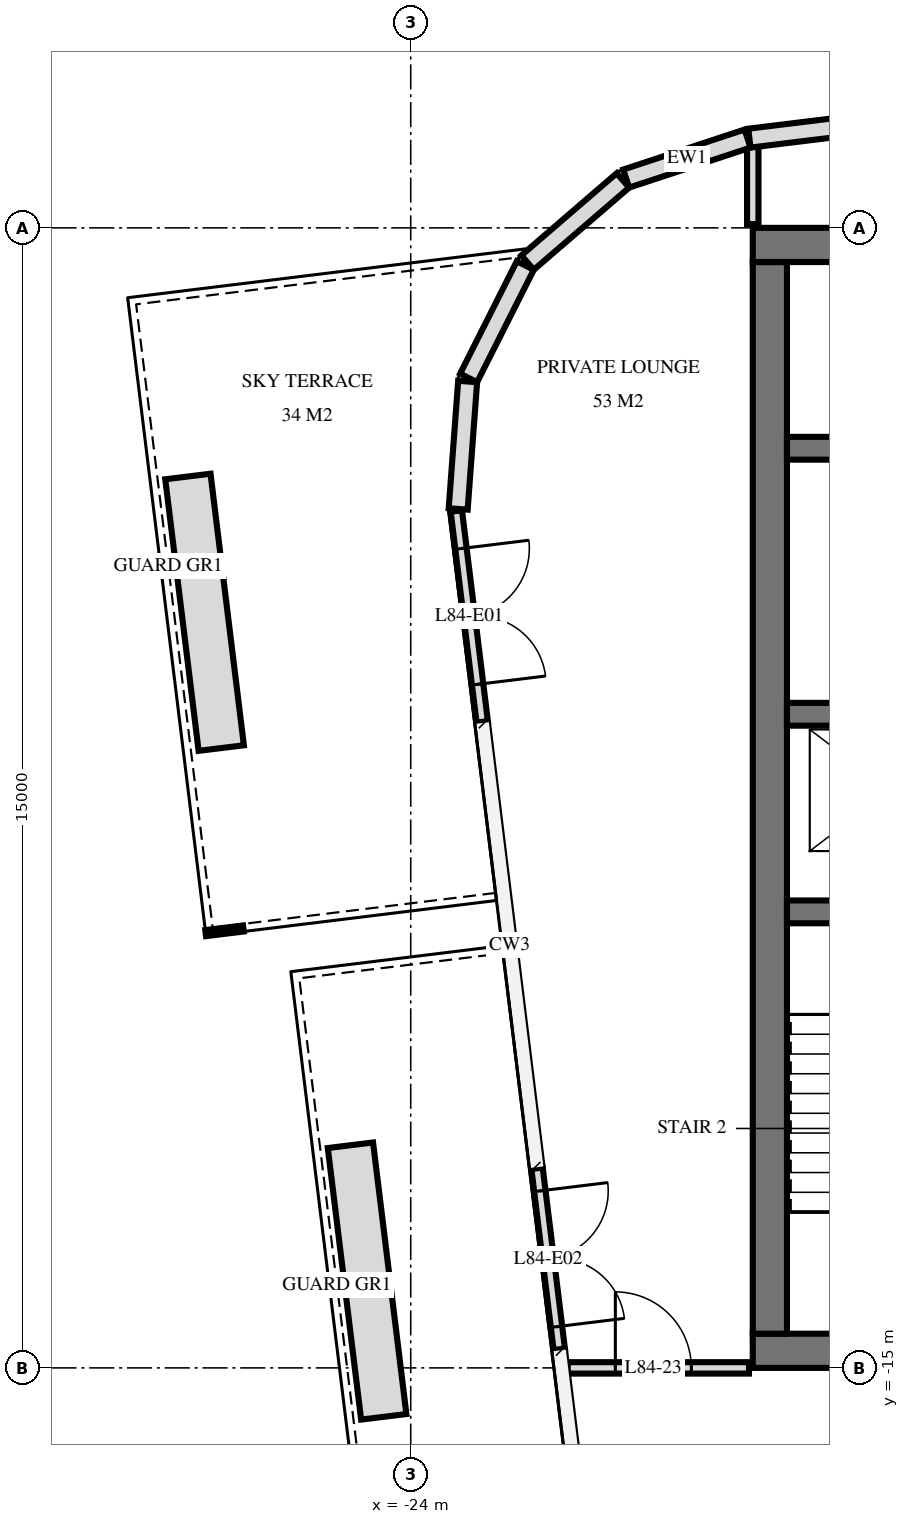
"""IFC4 building model, lengths in metres.
Left out: names, types, materials, properties, quantities, classifications, styles, units other than length and angle.
Written with IfcOpenShell. Run it as: python <this file> out.ifc"""

import sys

from ifc_helpers import new_model, si_unit, direction, frame, frame_2d, origin, place, context, subcontext, project, spatial, rectangle, extrude, element, fill, save


model = new_model("IFC4")
c1 = context("Model", 3, precision=1e-05, world=origin(), true_north=direction((0.0, 1.0)))
c2 = subcontext(c1, "Body", "Model", "MODEL_VIEW")
j1 = project(units=[si_unit("LENGTHUNIT", "METRE"), si_unit("PLANEANGLEUNIT", "RADIAN")], contexts=[c1])
p1 = place(None, origin())
s1 = spatial("IfcSite", under=j1, at=p1, CompositionType="ELEMENT")
p2 = place(p1, origin())
s2 = spatial("IfcBuilding", under=s1, at=p2, CompositionType="ELEMENT")
p3 = place(p2, frame((0.0, 0.0, 318.6)))
s3 = spatial("IfcBuildingStorey", under=s2, at=p3, CompositionType="ELEMENT", Elevation=318.6)
p4 = place(p3, frame((-19.5, -0.225, 0.0), z_axis=(0.0, 0.0, 1.0), x_axis=(1.0, 0.0, 0.0)))
e1 = element("IfcWall", 1, at=p4, inside=s3, PredefinedType="SHEAR", context=c2, shape_type="SweptSolid", body=[
    extrude(rectangle(XDim=9.5, YDim=0.45, at=frame_2d((4.75, 0.0))), origin(), (0.0, 0.0, 1.0), 4.0),
])
p5 = place(p3, frame((-19.5, -14.775, 0.0), z_axis=(0.0, 0.0, 1.0), x_axis=(1.0, 0.0, 0.0)))
e2 = element("IfcWall", 2, at=p5, inside=s3, PredefinedType="SHEAR", context=c2, shape_type="SweptSolid", body=[
    extrude(rectangle(XDim=9.5, YDim=0.45, at=frame_2d((4.75, 0.0))), origin(), (0.0, 0.0, 1.0), 4.0),
])
p6 = place(p5, frame((1.2, 0.0, 0.0)))
e3 = element("IfcOpeningElement", 3, at=p6, cuts=e2, PredefinedType="OPENING", context=c2, shape_type="SweptSolid", body=[
    extrude(rectangle(XDim=1.2, YDim=2.1, at=frame_2d((0.6, 1.05))), frame((0.0, 0.235, 0.0), z_axis=(0.0, -1.0, 0.0), x_axis=(1.0, 0.0, 0.0)), (0.0, 0.0, 1.0), 0.47),
])
p7 = place(p5, frame((4.25, 0.0, 0.0)))
e4 = element("IfcOpeningElement", 4, at=p7, cuts=e2, PredefinedType="OPENING", context=c2, shape_type="SweptSolid", body=[
    extrude(rectangle(XDim=1.1, YDim=2.1, at=frame_2d((0.55, 1.05))), frame((0.0, 0.235, 0.0), z_axis=(0.0, -1.0, 0.0), x_axis=(1.0, 0.0, 0.0)), (0.0, 0.0, 1.0), 0.47),
])
p8 = place(p3, frame((-19.275, -14.55, 0.0), z_axis=(0.0, 0.0, 1.0), x_axis=(0.0, 1.0, 0.0)))
e5 = element("IfcWall", 5, at=p8, inside=s3, PredefinedType="SHEAR", context=c2, shape_type="SweptSolid", body=[
    extrude(rectangle(XDim=14.1, YDim=0.45, at=frame_2d((7.05, 0.0))), origin(), (0.0, 0.0, 1.0), 4.0),
])
p9 = place(p3, frame((-19.05, -2.9, 0.0), z_axis=(0.0, 0.0, 1.0), x_axis=(1.0, 0.0, 0.0)))
e6 = element("IfcWall", 6, at=p9, inside=s3, PredefinedType="SHEAR", context=c2, shape_type="SweptSolid", body=[
    extrude(rectangle(XDim=8.7, YDim=0.3, at=frame_2d((4.35, 0.0))), origin(), (0.0, 0.0, 1.0), 4.0),
])
p10 = place(p9, frame((6.8, 0.0, 0.0)))
e7 = element("IfcOpeningElement", 7, at=p10, cuts=e6, PredefinedType="OPENING", context=c2, shape_type="SweptSolid", body=[
    extrude(rectangle(XDim=1.1, YDim=2.1, at=frame_2d((0.55, 1.05))), frame((0.0, 0.16, 0.0), z_axis=(0.0, -1.0, 0.0), x_axis=(1.0, 0.0, 0.0)), (0.0, 0.0, 1.0), 0.32),
])
p11 = place(p9, frame((3.8, 0.0, 0.0)))
e8 = element("IfcOpeningElement", 8, at=p11, cuts=e6, PredefinedType="OPENING", context=c2, shape_type="SweptSolid", body=[
    extrude(rectangle(XDim=1.1, YDim=2.1, at=frame_2d((0.55, 1.05))), frame((0.0, 0.16, 0.0), z_axis=(0.0, -1.0, 0.0), x_axis=(1.0, 0.0, 0.0)), (0.0, 0.0, 1.0), 0.32),
])
p12 = place(p9, frame((0.9, 0.0, 0.0)))
e9 = element("IfcOpeningElement", 9, at=p12, cuts=e6, PredefinedType="OPENING", context=c2, shape_type="SweptSolid", body=[
    extrude(rectangle(XDim=0.9, YDim=2.1, at=frame_2d((0.45, 1.05))), frame((0.0, 0.16, 0.0), z_axis=(0.0, -1.0, 0.0), x_axis=(1.0, 0.0, 0.0)), (0.0, 0.0, 1.0), 0.32),
])
p13 = place(p3, frame((-19.05, -6.4, 0.0), z_axis=(0.0, 0.0, 1.0), x_axis=(1.0, 0.0, 0.0)))
e10 = element("IfcWall", 10, at=p13, inside=s3, PredefinedType="SHEAR", context=c2, shape_type="SweptSolid", body=[
    extrude(rectangle(XDim=8.7, YDim=0.3, at=frame_2d((4.35, 0.0))), origin(), (0.0, 0.0, 1.0), 4.0),
])
p14 = place(p13, frame((0.8, 0.0, 0.0)))
e11 = element("IfcOpeningElement", 11, at=p14, cuts=e10, PredefinedType="OPENING", context=c2, shape_type="SweptSolid", body=[
    extrude(rectangle(XDim=1.1, YDim=2.1, at=frame_2d((0.55, 1.05))), frame((0.0, 0.16, 0.0), z_axis=(0.0, -1.0, 0.0), x_axis=(1.0, 0.0, 0.0)), (0.0, 0.0, 1.0), 0.32),
])
p15 = place(p3, frame((-19.05, -9.0, 0.0), z_axis=(0.0, 0.0, 1.0), x_axis=(1.0, 0.0, 0.0)))
e12 = element("IfcWall", 12, at=p15, inside=s3, PredefinedType="SHEAR", context=c2, shape_type="SweptSolid", body=[
    extrude(rectangle(XDim=8.7, YDim=0.3, at=frame_2d((4.35, 0.0))), origin(), (0.0, 0.0, 1.0), 4.0),
])
p16 = place(p15, frame((3.8, 0.0, 0.0)))
e13 = element("IfcOpeningElement", 13, at=p16, cuts=e12, PredefinedType="OPENING", context=c2, shape_type="SweptSolid", body=[
    extrude(rectangle(XDim=1.1, YDim=2.1, at=frame_2d((0.55, 1.05))), frame((0.0, 0.16, 0.0), z_axis=(0.0, -1.0, 0.0), x_axis=(1.0, 0.0, 0.0)), (0.0, 0.0, 1.0), 0.32),
])
p17 = place(p3, frame((16.138, 5.561, 0.0), z_axis=(0.0, 0.0, 1.0), x_axis=(-0.992546726876, -0.121864658405, 0.0)))
e14 = element("IfcWall", 14, at=p17, inside=s3, PredefinedType="SOLIDWALL", context=c2, shape_type="SweptSolid", body=[
    extrude(rectangle(XDim=35.951, YDim=0.25, at=frame_2d((17.975, 0.0))), origin(), (0.0, 0.0, 1.0), 3.72),
])
p18 = place(p3, frame((-19.568, 1.175, 0.0), z_axis=(0.0, 0.0, 1.0), x_axis=(-0.949694735798, -0.313177120489, 0.0)))
e15 = element("IfcWall", 15, at=p18, inside=s3, PredefinedType="SOLIDWALL", context=c2, shape_type="SweptSolid", body=[
    extrude(rectangle(XDim=1.681, YDim=0.25, at=frame_2d((0.841, 0.0))), origin(), (0.0, 0.0, 1.0), 3.72),
])
p19 = place(p3, frame((-21.208, 0.624, 0.0), z_axis=(0.0, 0.0, 1.0), x_axis=(-0.757568315466, -0.652755886531, 0.0)))
e16 = element("IfcWall", 16, at=p19, inside=s3, PredefinedType="SOLIDWALL", context=c2, shape_type="SweptSolid", body=[
    extrude(rectangle(XDim=1.656, YDim=0.25, at=frame_2d((0.828, 0.0))), origin(), (0.0, 0.0, 1.0), 3.72),
])
p20 = place(p3, frame((-22.493, -0.495, 0.0), z_axis=(0.0, 0.0, 1.0), x_axis=(-0.449982385812, -0.893037430604, 0.0)))
e17 = element("IfcWall", 17, at=p20, inside=s3, PredefinedType="SOLIDWALL", context=c2, shape_type="SweptSolid", body=[
    extrude(rectangle(XDim=1.656, YDim=0.25, at=frame_2d((0.828, 0.0))), origin(), (0.0, 0.0, 1.0), 3.72),
])
p21 = place(p3, frame((-23.251, -2.021, 0.0), z_axis=(0.0, 0.0, 1.0), x_axis=(-0.074053534713, -0.997254267475, 0.0)))
e18 = element("IfcWall", 18, at=p21, inside=s3, PredefinedType="SOLIDWALL", context=c2, shape_type="SweptSolid", body=[
    extrude(rectangle(XDim=1.681, YDim=0.25, at=frame_2d((0.841, 0.0))), origin(), (0.0, 0.0, 1.0), 3.72),
])
p22 = place(p3, frame((-23.4, -3.726, 0.0), z_axis=(0.0, 0.0, 1.0), x_axis=(0.121830924856, -0.992550868091, 0.0)))
e19 = element("IfcWall", 19, at=p22, inside=s3, PredefinedType="USERDEFINED", context=c2, shape_type="SweptSolid", body=[
    extrude(rectangle(XDim=2.795, YDim=0.15, at=frame_2d((1.398, 0.0))), origin(), (0.0, 0.0, 1.0), 3.72),
])
p23 = place(p22, frame((0.498, 0.0, 0.0)))
e20 = element("IfcOpeningElement", 20, at=p23, cuts=e19, PredefinedType="OPENING", context=c2, shape_type="SweptSolid", body=[
    extrude(rectangle(XDim=1.8, YDim=2.4, at=frame_2d((0.9, 1.2))), frame((0.0, 0.085, 0.0), z_axis=(0.0, -1.0, 0.0), x_axis=(1.0, 0.0, 0.0)), (0.0, 0.0, 1.0), 0.17),
])
p24 = place(p3, frame((-22.338, -12.374, 0.0), z_axis=(0.0, 0.0, 1.0), x_axis=(0.121868445399, -0.992546261902, 0.0)))
e21 = element("IfcWall", 21, at=p24, inside=s3, PredefinedType="USERDEFINED", context=c2, shape_type="SweptSolid", body=[
    extrude(rectangle(XDim=2.4, YDim=0.15, at=frame_2d((1.2, 0.0))), origin(), (0.0, 0.0, 1.0), 3.72),
])
p25 = place(p24, frame((0.3, 0.0, 0.0)))
e22 = element("IfcOpeningElement", 22, at=p25, cuts=e21, PredefinedType="OPENING", context=c2, shape_type="SweptSolid", body=[
    extrude(rectangle(XDim=1.8, YDim=2.4, at=frame_2d((0.9, 1.2))), frame((0.0, 0.085, 0.0), z_axis=(0.0, -1.0, 0.0), x_axis=(1.0, 0.0, 0.0)), (0.0, 0.0, 1.0), 0.17),
])
for number, where, z_axis, x_axis in (
    (23, (-24.355, -15.644, 0.0), (0.0, 0.0, 1.0), (-0.122, 0.993, 0.0)),
    (24, (-26.493, -6.845, 0.0), (0.0, 0.0, 1.0), (-0.122, 0.993, 0.0)),
):
    element("IfcWall", number, at=place(p3, frame(where, z_axis=z_axis, x_axis=x_axis)), inside=s3, PredefinedType="USERDEFINED", context=c2, shape_type="SweptSolid", body=[
        extrude(rectangle(XDim=3.6, YDim=0.6, at=frame_2d((1.8, 0.0))), origin(), (0.0, 0.0, 1.0), 0.65),
    ])
p26 = place(p3, frame((-19.5, 0.05, 0.0), z_axis=(0.0, 0.0, 1.0), x_axis=(0.0, 1.0, 0.0)))
e25 = element("IfcWall", 25, at=p26, inside=s3, PredefinedType="PARTITIONING", context=c2, shape_type="SweptSolid", body=[
    extrude(rectangle(XDim=1.08, YDim=0.15, at=frame_2d((0.54, 0.0))), origin(), (0.0, 0.0, 1.0), 3.72),
])
p27 = place(p3, frame((-21.935, -15.0, 0.0), z_axis=(0.0, 0.0, 1.0), x_axis=(1.0, 0.0, 0.0)))
e26 = element("IfcWall", 26, at=p27, inside=s3, PredefinedType="PARTITIONING", context=c2, shape_type="SweptSolid", body=[
    extrude(rectangle(XDim=2.385, YDim=0.15, at=frame_2d((1.192, 0.0))), origin(), (0.0, 0.0, 1.0), 3.72),
])
p28 = place(p27, frame((0.627, 0.0, 0.0)))
e27 = element("IfcOpeningElement", 27, at=p28, cuts=e26, PredefinedType="OPENING", context=c2, shape_type="SweptSolid", body=[
    extrude(rectangle(XDim=1.0, YDim=2.1, at=frame_2d((0.5, 1.05))), frame((0.0, 0.085, 0.0), z_axis=(0.0, -1.0, 0.0), x_axis=(1.0, 0.0, 0.0)), (0.0, 0.0, 1.0), 0.17),
])
p29 = place(p23, origin())
e28 = element("IfcDoor", 28, at=p29, inside=s3, OperationType="DOUBLE_DOOR_SINGLE_SWING", PredefinedType="DOOR", context=c2, shape_type="SweptSolid", body=[
    extrude(rectangle(XDim=1.8, YDim=2.4, at=frame_2d((0.9, 1.2))), frame((0.0, 0.025, 0.0), z_axis=(0.0, -1.0, 0.0), x_axis=(1.0, 0.0, 0.0)), (0.0, 0.0, 1.0), 0.05),
])
fill(e20, e28)
p30 = place(p25, origin())
e29 = element("IfcDoor", 29, at=p30, inside=s3, OperationType="DOUBLE_DOOR_SINGLE_SWING", PredefinedType="DOOR", context=c2, shape_type="SweptSolid", body=[
    extrude(rectangle(XDim=1.8, YDim=2.4, at=frame_2d((0.9, 1.2))), frame((0.0, 0.025, 0.0), z_axis=(0.0, -1.0, 0.0), x_axis=(1.0, 0.0, 0.0)), (0.0, 0.0, 1.0), 0.05),
])
fill(e22, e29)
p31 = place(p28, origin())
e30 = element("IfcDoor", 30, at=p31, inside=s3, OperationType="SINGLE_SWING_RIGHT", PredefinedType="DOOR", context=c2, shape_type="SweptSolid", body=[
    extrude(rectangle(XDim=1.0, YDim=2.1, at=frame_2d((0.5, 1.05))), frame((0.0, 0.025, 0.0), z_axis=(0.0, -1.0, 0.0), x_axis=(1.0, 0.0, 0.0)), (0.0, 0.0, 1.0), 0.05),
])
fill(e27, e30)
save(model, sys.argv[1])
